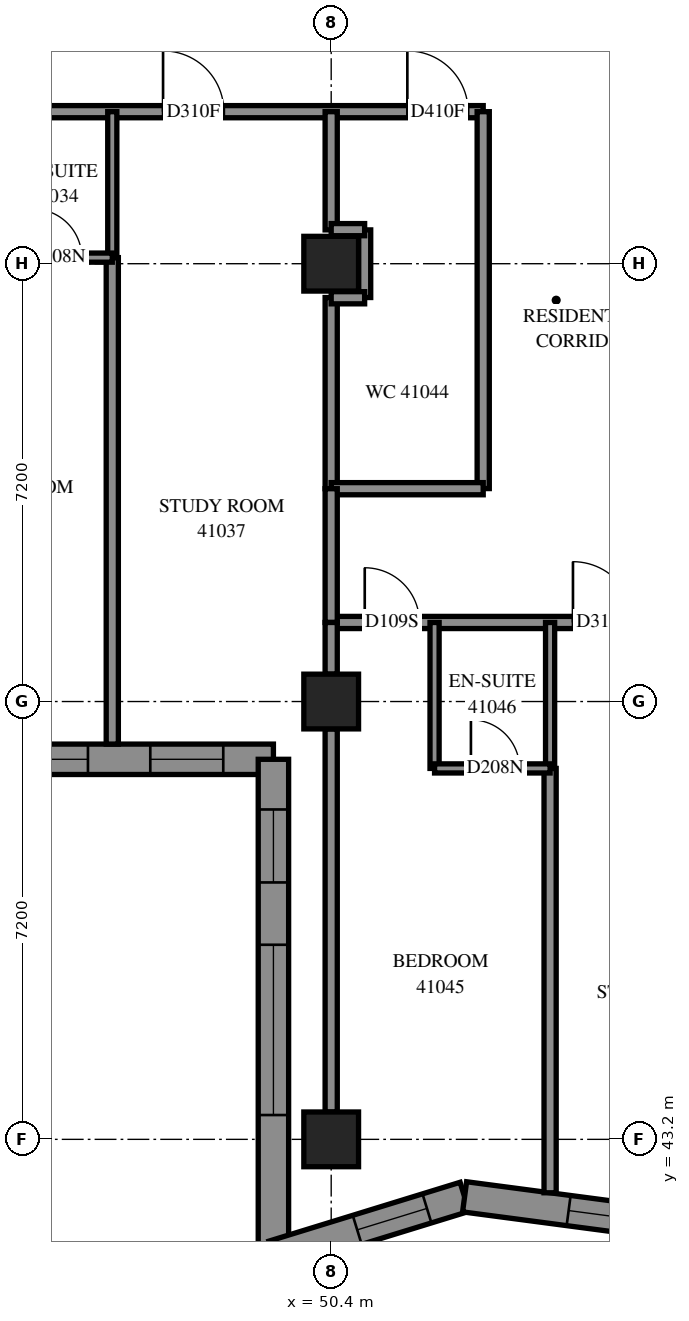
"""IFC4 building model, lengths in metres.
Left out: names, types, materials, properties, quantities, classifications, styles, units other than length and angle.
Written with IfcOpenShell. Run it as: python <this file> out.ifc"""

import sys

from ifc_helpers import new_model, si_unit, direction, frame, frame_2d, origin, origin_2d, place, context, subcontext, project, spatial, polyline, rectangle, outline, extrude, element, fill, save


model = new_model("IFC4")
c1 = context("Model", 3, precision=1e-05, world=origin(), true_north=direction((0.0, 1.0)))
c2 = subcontext(c1, "Body", "Model", "MODEL_VIEW")
j1 = project(units=[si_unit("LENGTHUNIT", "METRE"), si_unit("PLANEANGLEUNIT", "RADIAN")], contexts=[c1])
p1 = place(None, origin())
s1 = spatial("IfcSite", under=j1, at=p1, CompositionType="ELEMENT")
p2 = place(p1, origin())
s2 = spatial("IfcBuilding", under=s1, at=p2, CompositionType="ELEMENT")
p3 = place(p2, frame((0.0, 0.0, 152.4)))
s3 = spatial("IfcBuildingStorey", under=s2, at=p3, CompositionType="ELEMENT", Elevation=152.4)
for number, where, z_axis, x_axis in (
    (1, (50.4, 43.2, 0.0), (0.0, 0.0, 1.0), (1.0, 0.0, 0.0)),
    (2, (50.4, 50.4, 0.0), (0.0, 0.0, 1.0), (1.0, 0.0, 0.0)),
    (3, (50.4, 57.6, 0.0), (0.0, 0.0, 1.0), (1.0, 0.0, 0.0)),
):
    element("IfcColumn", number, at=place(p3, frame(where, z_axis=z_axis, x_axis=x_axis)), inside=s3, PredefinedType="COLUMN", context=c2, shape_type="SweptSolid", body=[
        extrude(rectangle(XDim=0.9, YDim=0.9, at=origin_2d()), origin(), (0.0, 0.0, 1.0), 3.1),
    ])
p4 = place(p3, frame((42.25, 49.45, 0.0), z_axis=(0.0, 0.0, 1.0), x_axis=(1.0, 0.0, 0.0)))
e4 = element("IfcWall", 4, at=p4, inside=s3, PredefinedType="SOLIDWALL", context=c2, shape_type="SweptSolid", body=[
    extrude(outline(polyline([(-0.25, -0.25), (6.95, -0.25), (7.45, 0.25), (0.25, 0.25), (-0.25, -0.25)])), origin(), (0.0, 0.0, 1.0), 3.1),
])
p5 = place(p4, frame((1.35, 0.0, 0.45)))
e5 = element("IfcOpeningElement", 5, at=p5, cuts=e4, PredefinedType="OPENING", context=c2, shape_type="SweptSolid", body=[
    extrude(rectangle(XDim=2.8, YDim=2.5, at=frame_2d((1.4, 1.25))), frame((0.0, 0.26, 0.0), z_axis=(0.0, -1.0, 0.0), x_axis=(1.0, 0.0, 0.0)), (0.0, 0.0, 1.0), 0.52),
])
p6 = place(p4, frame((5.175, 0.0, 0.45)))
e6 = element("IfcOpeningElement", 6, at=p6, cuts=e4, PredefinedType="OPENING", context=c2, shape_type="SweptSolid", body=[
    extrude(rectangle(XDim=1.2, YDim=2.5, at=frame_2d((0.6, 1.25))), frame((0.0, 0.26, 0.0), z_axis=(0.0, -1.0, 0.0), x_axis=(1.0, 0.0, 0.0)), (0.0, 0.0, 1.0), 0.52),
])
p7 = place(p3, frame((49.45, 49.45, 0.0), z_axis=(0.0, 0.0, 1.0), x_axis=(0.0, -1.0, 0.0)))
e7 = element("IfcWall", 7, at=p7, inside=s3, PredefinedType="SOLIDWALL", context=c2, shape_type="SweptSolid", body=[
    extrude(outline(polyline([(0.25, -0.25), (8.501, -0.25), (7.824, 0.25), (-0.25, 0.25), (0.25, -0.25)])), origin(), (0.0, 0.0, 1.0), 3.1),
])
p8 = place(p7, frame((3.05, 0.0, 0.45)))
e8 = element("IfcOpeningElement", 8, at=p8, cuts=e7, PredefinedType="OPENING", context=c2, shape_type="SweptSolid", body=[
    extrude(rectangle(XDim=2.8, YDim=2.5, at=frame_2d((1.4, 1.25))), frame((0.0, 0.26, 0.0), z_axis=(0.0, -1.0, 0.0), x_axis=(1.0, 0.0, 0.0)), (0.0, 0.0, 1.0), 0.52),
])
p9 = place(p7, frame((0.825, 0.0, 0.45)))
e9 = element("IfcOpeningElement", 9, at=p9, cuts=e7, PredefinedType="OPENING", context=c2, shape_type="SweptSolid", body=[
    extrude(rectangle(XDim=1.2, YDim=2.5, at=frame_2d((0.6, 1.25))), frame((0.0, 0.26, 0.0), z_axis=(0.0, -1.0, 0.0), x_axis=(1.0, 0.0, 0.0)), (0.0, 0.0, 1.0), 0.52),
])
p10 = place(p3, frame((49.45, 41.288, 0.0), z_axis=(0.0, 0.0, 1.0), x_axis=(0.9557612585, 0.2941435308, 0.0)))
e10 = element("IfcWall", 10, at=p10, inside=s3, PredefinedType="SOLIDWALL", context=c2, shape_type="SweptSolid", body=[
    extrude(outline(polyline([(-0.339, -0.25), (3.235, -0.25), (3.344, 0.25), (0.339, 0.25), (-0.339, -0.25)])), origin(), (0.0, 0.0, 1.0), 3.1),
])
p11 = place(p10, frame((1.442, 0.0, 0.45)))
e11 = element("IfcOpeningElement", 11, at=p11, cuts=e10, PredefinedType="OPENING", context=c2, shape_type="SweptSolid", body=[
    extrude(rectangle(XDim=1.2, YDim=2.5, at=frame_2d((0.6, 1.25))), frame((0.0, 0.26, 0.0), z_axis=(0.0, -1.0, 0.0), x_axis=(1.0, 0.0, 0.0)), (0.0, 0.0, 1.0), 0.52),
])
p12 = place(p3, frame((52.594, 42.255, 0.0), z_axis=(0.0, 0.0, 1.0), x_axis=(0.9913929124, -0.1309201792, 0.0)))
e12 = element("IfcWall", 12, at=p12, inside=s3, PredefinedType="SOLIDWALL", context=c2, shape_type="SweptSolid", body=[
    extrude(outline(polyline([(0.055, -0.25), (3.499, -0.25), (3.433, 0.25), (-0.055, 0.25), (0.055, -0.25)])), origin(), (0.0, 0.0, 1.0), 3.1),
])
p13 = place(p12, frame((1.726, 0.0, 0.45)))
e13 = element("IfcOpeningElement", 13, at=p13, cuts=e12, PredefinedType="OPENING", context=c2, shape_type="SweptSolid", body=[
    extrude(rectangle(XDim=1.2, YDim=2.5, at=frame_2d((0.6, 1.25))), frame((0.0, 0.26, 0.0), z_axis=(0.0, -1.0, 0.0), x_axis=(1.0, 0.0, 0.0)), (0.0, 0.0, 1.0), 0.52),
])
p14 = place(p3, frame((36.0, 60.1, 0.0), z_axis=(0.0, 0.0, 1.0), x_axis=(1.0, 0.0, 0.0)))
e14 = element("IfcWall", 14, at=p14, inside=s3, PredefinedType="PARTITIONING", context=c2, shape_type="SweptSolid", body=[
    extrude(rectangle(XDim=16.9, YDim=0.2, at=frame_2d((8.45, 0.0))), origin(), (0.0, 0.0, 1.0), 3.1),
])
p15 = place(p14, frame((4.125, 0.0, 0.0)))
e15 = element("IfcOpeningElement", 15, at=p15, cuts=e14, PredefinedType="OPENING", context=c2, shape_type="SweptSolid", body=[
    extrude(rectangle(XDim=1.0, YDim=2.1, at=frame_2d((0.5, 1.05))), frame((0.0, 0.11, 0.0), z_axis=(0.0, -1.0, 0.0), x_axis=(1.0, 0.0, 0.0)), (0.0, 0.0, 1.0), 0.22),
])
p16 = place(p14, frame((7.6, 0.0, 0.0)))
e16 = element("IfcOpeningElement", 16, at=p16, cuts=e14, PredefinedType="OPENING", context=c2, shape_type="SweptSolid", body=[
    extrude(rectangle(XDim=0.9, YDim=2.1, at=frame_2d((0.45, 1.05))), frame((0.0, 0.11, 0.0), z_axis=(0.0, -1.0, 0.0), x_axis=(1.0, 0.0, 0.0)), (0.0, 0.0, 1.0), 0.22),
])
p17 = place(p14, frame((11.635, 0.0, 0.0)))
e17 = element("IfcOpeningElement", 17, at=p17, cuts=e14, PredefinedType="OPENING", context=c2, shape_type="SweptSolid", body=[
    extrude(rectangle(XDim=1.0, YDim=2.1, at=frame_2d((0.5, 1.05))), frame((0.0, 0.11, 0.0), z_axis=(0.0, -1.0, 0.0), x_axis=(1.0, 0.0, 0.0)), (0.0, 0.0, 1.0), 0.22),
])
p18 = place(p14, frame((15.652, 0.0, 0.0)))
e18 = element("IfcOpeningElement", 18, at=p18, cuts=e14, PredefinedType="OPENING", context=c2, shape_type="SweptSolid", body=[
    extrude(rectangle(XDim=1.0, YDim=2.1, at=frame_2d((0.5, 1.05))), frame((0.0, 0.11, 0.0), z_axis=(0.0, -1.0, 0.0), x_axis=(1.0, 0.0, 0.0)), (0.0, 0.0, 1.0), 0.22),
])
p19 = place(p3, frame((46.8, 49.7, 0.0), z_axis=(0.0, 0.0, 1.0), x_axis=(0.0, 1.0, 0.0)))
e19 = element("IfcWall", 19, at=p19, inside=s3, PredefinedType="PARTITIONING", context=c2, shape_type="SweptSolid", body=[
    extrude(rectangle(XDim=8.0, YDim=0.2, at=frame_2d((4.0, 0.0))), origin(), (0.0, 0.0, 1.0), 3.1),
])
p20 = place(p3, frame((54.0, 42.321, 0.0), z_axis=(0.0, 0.0, 1.0), x_axis=(0.0, 1.0, 0.0)))
e20 = element("IfcWall", 20, at=p20, inside=s3, PredefinedType="PARTITIONING", context=c2, shape_type="SweptSolid", body=[
    extrude(rectangle(XDim=6.979, YDim=0.2, at=frame_2d((3.489, 0.0))), origin(), (0.0, 0.0, 1.0), 3.1),
])
p21 = place(p3, frame((50.4, 43.65, 0.0), z_axis=(0.0, 0.0, 1.0), x_axis=(0.0, 1.0, 0.0)))
e21 = element("IfcWall", 21, at=p21, inside=s3, PredefinedType="PARTITIONING", context=c2, shape_type="SweptSolid", body=[
    extrude(rectangle(XDim=6.3, YDim=0.2, at=frame_2d((3.15, 0.0))), origin(), (0.0, 0.0, 1.0), 2.6),
])
p22 = place(p3, frame((52.9, 53.902, 0.0), z_axis=(0.0, 0.0, 1.0), x_axis=(0.0, 1.0, 0.0)))
e22 = element("IfcWall", 22, at=p22, inside=s3, PredefinedType="PARTITIONING", context=c2, shape_type="SweptSolid", body=[
    extrude(rectangle(XDim=6.198, YDim=0.2, at=frame_2d((3.099, 0.0))), origin(), (0.0, 0.0, 1.0), 3.1),
])
p23 = place(p3, frame((50.4, 51.7, 0.0), z_axis=(0.0, 0.0, 1.0), x_axis=(1.0, 0.0, 0.0)))
e23 = element("IfcWall", 23, at=p23, inside=s3, PredefinedType="PARTITIONING", context=c2, shape_type="SweptSolid", body=[
    extrude(rectangle(XDim=5.1, YDim=0.2, at=frame_2d((2.55, 0.0))), origin(), (0.0, 0.0, 1.0), 3.1),
])
p24 = place(p23, frame((0.552, 0.0, 0.0)))
e24 = element("IfcOpeningElement", 24, at=p24, cuts=e23, PredefinedType="OPENING", context=c2, shape_type="SweptSolid", body=[
    extrude(rectangle(XDim=0.9, YDim=2.1, at=frame_2d((0.45, 1.05))), frame((0.0, 0.11, 0.0), z_axis=(0.0, -1.0, 0.0), x_axis=(1.0, 0.0, 0.0)), (0.0, 0.0, 1.0), 0.22),
])
p25 = place(p23, frame((3.976, 0.0, 0.0)))
e25 = element("IfcOpeningElement", 25, at=p25, cuts=e23, PredefinedType="OPENING", context=c2, shape_type="SweptSolid", body=[
    extrude(rectangle(XDim=1.0, YDim=2.1, at=frame_2d((0.5, 1.05))), frame((0.0, 0.11, 0.0), z_axis=(0.0, -1.0, 0.0), x_axis=(1.0, 0.0, 0.0)), (0.0, 0.0, 1.0), 0.22),
])
p26 = place(p3, frame((50.4, 53.9, 0.0), z_axis=(0.0, 0.0, 1.0), x_axis=(0.0, 1.0, 0.0)))
e26 = element("IfcWall", 26, at=p26, inside=s3, PredefinedType="PARTITIONING", context=c2, shape_type="SweptSolid", body=[
    extrude(rectangle(XDim=3.144, YDim=0.2, at=frame_2d((1.572, 0.0))), origin(), (0.0, 0.0, 1.0), 3.1),
])
p27 = place(p3, frame((50.4, 53.9, 0.0), z_axis=(0.0, 0.0, 1.0), x_axis=(1.0, 0.0, 0.0)))
e27 = element("IfcWall", 27, at=p27, inside=s3, PredefinedType="PARTITIONING", context=c2, shape_type="SweptSolid", body=[
    extrude(rectangle(XDim=2.5, YDim=0.2, at=frame_2d((1.25, 0.0))), origin(), (0.0, 0.0, 1.0), 3.1),
])
for number, where, z_axis, x_axis in (
    (28, (52.1, 49.3, 0.0), (0.0, 0.0, 1.0), (0.0, 1.0, 0.0)),
    (29, (54.0, 49.3, 0.0), (0.0, 0.0, 1.0), (0.0, 1.0, 0.0)),
    (30, (46.8, 57.7, 0.0), (0.0, 0.0, 1.0), (0.0, 1.0, 0.0)),
):
    element("IfcWall", number, at=place(p3, frame(where, z_axis=z_axis, x_axis=x_axis)), inside=s3, PredefinedType="PARTITIONING", context=c2, shape_type="SweptSolid", body=[
        extrude(rectangle(XDim=2.4, YDim=0.15, at=frame_2d((1.2, 0.0))), origin(), (0.0, 0.0, 1.0), 3.1),
    ])
p28 = place(p3, frame((50.4, 51.7, 0.0), z_axis=(0.0, 0.0, 1.0), x_axis=(0.0, 1.0, 0.0)))
e31 = element("IfcWall", 31, at=p28, inside=s3, PredefinedType="PARTITIONING", context=c2, shape_type="SweptSolid", body=[
    extrude(rectangle(XDim=2.2, YDim=0.2, at=frame_2d((1.1, 0.0))), origin(), (0.0, 0.0, 1.0), 3.1),
])
p29 = place(p3, frame((50.4, 58.156, 0.0), z_axis=(0.0, 0.0, 1.0), x_axis=(0.0, 1.0, 0.0)))
e32 = element("IfcWall", 32, at=p29, inside=s3, PredefinedType="PARTITIONING", context=c2, shape_type="SweptSolid", body=[
    extrude(rectangle(XDim=1.944, YDim=0.2, at=frame_2d((0.972, 0.0))), origin(), (0.0, 0.0, 1.0), 3.1),
])
p30 = place(p3, frame((44.9, 57.7, 0.0), z_axis=(0.0, 0.0, 1.0), x_axis=(1.0, 0.0, 0.0)))
e33 = element("IfcWall", 33, at=p30, inside=s3, PredefinedType="PARTITIONING", context=c2, shape_type="SweptSolid", body=[
    extrude(rectangle(XDim=1.9, YDim=0.15, at=frame_2d((0.95, 0.0))), origin(), (0.0, 0.0, 1.0), 3.1),
])
p31 = place(p30, frame((0.598, 0.0, 0.0)))
e34 = element("IfcOpeningElement", 34, at=p31, cuts=e33, PredefinedType="OPENING", context=c2, shape_type="SweptSolid", body=[
    extrude(rectangle(XDim=0.8, YDim=2.1, at=frame_2d((0.4, 1.05))), frame((0.0, 0.085, 0.0), z_axis=(0.0, -1.0, 0.0), x_axis=(1.0, 0.0, 0.0)), (0.0, 0.0, 1.0), 0.17),
])
p32 = place(p3, frame((52.1, 49.3, 0.0), z_axis=(0.0, 0.0, 1.0), x_axis=(1.0, 0.0, 0.0)))
e35 = element("IfcWall", 35, at=p32, inside=s3, PredefinedType="PARTITIONING", context=c2, shape_type="SweptSolid", body=[
    extrude(rectangle(XDim=1.9, YDim=0.15, at=frame_2d((0.95, 0.0))), origin(), (0.0, 0.0, 1.0), 3.1),
])
p33 = place(p32, frame((0.598, 0.0, 0.0)))
e36 = element("IfcOpeningElement", 36, at=p33, cuts=e35, PredefinedType="OPENING", context=c2, shape_type="SweptSolid", body=[
    extrude(rectangle(XDim=0.8, YDim=2.1, at=frame_2d((0.4, 1.05))), frame((0.0, 0.085, 0.0), z_axis=(0.0, -1.0, 0.0), x_axis=(1.0, 0.0, 0.0)), (0.0, 0.0, 1.0), 0.17),
])
p34 = place(p3, frame((50.95, 57.044, 0.0), z_axis=(0.0, 0.0, 1.0), x_axis=(0.0, 1.0, 0.0)))
e37 = element("IfcWall", 37, at=p34, inside=s3, PredefinedType="PARTITIONING", context=c2, shape_type="SweptSolid", body=[
    extrude(rectangle(XDim=1.112, YDim=0.2, at=frame_2d((0.556, 0.0))), origin(), (0.0, 0.0, 1.0), 3.1),
])
p35 = place(p3, frame((50.4, 50.85, 0.0), z_axis=(0.0, 0.0, 1.0), x_axis=(0.0, 1.0, 0.0)))
e38 = element("IfcWall", 38, at=p35, inside=s3, PredefinedType="PARTITIONING", context=c2, shape_type="SweptSolid", body=[
    extrude(rectangle(XDim=0.85, YDim=0.2, at=frame_2d((0.425, 0.0))), origin(), (0.0, 0.0, 1.0), 3.1),
])
for number, where, z_axis, x_axis in (
    (39, (50.4, 58.16, 0.0), (0.0, 0.0, 1.0), (1.0, 0.0, 0.0)),
    (40, (50.4, 57.04, 0.0), (0.0, 0.0, 1.0), (1.0, 0.0, 0.0)),
):
    element("IfcWall", number, at=place(p3, frame(where, z_axis=z_axis, x_axis=x_axis)), inside=s3, PredefinedType="PARTITIONING", context=c2, shape_type="SweptSolid", body=[
        extrude(rectangle(XDim=0.55, YDim=0.2, at=frame_2d((0.275, 0.0))), origin(), (0.0, 0.0, 1.0), 3.1),
    ])
p36 = place(p5, origin())
e41 = element("IfcWindow", 41, at=p36, inside=s3, PartitioningType="SINGLE_PANEL", PredefinedType="WINDOW", context=c2, shape_type="SweptSolid", body=[
    extrude(rectangle(XDim=2.8, YDim=2.5, at=frame_2d((1.4, 1.25))), frame((0.0, 0.18, 0.0), z_axis=(0.0, -1.0, 0.0), x_axis=(1.0, 0.0, 0.0)), (0.0, 0.0, 1.0), 0.06),
])
fill(e5, e41)
p37 = place(p6, origin())
e42 = element("IfcWindow", 42, at=p37, inside=s3, PartitioningType="SINGLE_PANEL", PredefinedType="WINDOW", context=c2, shape_type="SweptSolid", body=[
    extrude(rectangle(XDim=1.2, YDim=2.5, at=frame_2d((0.6, 1.25))), frame((0.0, 0.18, 0.0), z_axis=(0.0, -1.0, 0.0), x_axis=(1.0, 0.0, 0.0)), (0.0, 0.0, 1.0), 0.06),
])
fill(e6, e42)
p38 = place(p8, origin())
e43 = element("IfcWindow", 43, at=p38, inside=s3, PartitioningType="SINGLE_PANEL", PredefinedType="WINDOW", context=c2, shape_type="SweptSolid", body=[
    extrude(rectangle(XDim=2.8, YDim=2.5, at=frame_2d((1.4, 1.25))), frame((0.0, 0.18, 0.0), z_axis=(0.0, -1.0, 0.0), x_axis=(1.0, 0.0, 0.0)), (0.0, 0.0, 1.0), 0.06),
])
fill(e8, e43)
p39 = place(p9, origin())
e44 = element("IfcWindow", 44, at=p39, inside=s3, PartitioningType="SINGLE_PANEL", PredefinedType="WINDOW", context=c2, shape_type="SweptSolid", body=[
    extrude(rectangle(XDim=1.2, YDim=2.5, at=frame_2d((0.6, 1.25))), frame((0.0, 0.18, 0.0), z_axis=(0.0, -1.0, 0.0), x_axis=(1.0, 0.0, 0.0)), (0.0, 0.0, 1.0), 0.06),
])
fill(e9, e44)
p40 = place(p11, origin())
e45 = element("IfcWindow", 45, at=p40, inside=s3, PartitioningType="SINGLE_PANEL", PredefinedType="WINDOW", context=c2, shape_type="SweptSolid", body=[
    extrude(rectangle(XDim=1.2, YDim=2.5, at=frame_2d((0.6, 1.25))), frame((0.0, 0.18, 0.0), z_axis=(0.0, -1.0, 0.0), x_axis=(1.0, 0.0, 0.0)), (0.0, 0.0, 1.0), 0.06),
])
fill(e11, e45)
p41 = place(p13, origin())
e46 = element("IfcWindow", 46, at=p41, inside=s3, PartitioningType="SINGLE_PANEL", PredefinedType="WINDOW", context=c2, shape_type="SweptSolid", body=[
    extrude(rectangle(XDim=1.2, YDim=2.5, at=frame_2d((0.6, 1.25))), frame((0.0, 0.18, 0.0), z_axis=(0.0, -1.0, 0.0), x_axis=(1.0, 0.0, 0.0)), (0.0, 0.0, 1.0), 0.06),
])
fill(e13, e46)
p42 = place(p31, origin())
e47 = element("IfcDoor", 47, at=p42, inside=s3, OperationType="SINGLE_SWING_RIGHT", PredefinedType="DOOR", context=c2, shape_type="SweptSolid", body=[
    extrude(rectangle(XDim=0.8, YDim=2.1, at=frame_2d((0.4, 1.05))), frame((0.0, 0.025, 0.0), z_axis=(0.0, -1.0, 0.0), x_axis=(1.0, 0.0, 0.0)), (0.0, 0.0, 1.0), 0.05),
])
fill(e34, e47)
p43 = place(p17, origin())
e48 = element("IfcDoor", 48, at=p43, inside=s3, OperationType="SINGLE_SWING_RIGHT", PredefinedType="DOOR", context=c2, shape_type="SweptSolid", body=[
    extrude(rectangle(XDim=1.0, YDim=2.1, at=frame_2d((0.5, 1.05))), frame((0.0, 0.025, 0.0), z_axis=(0.0, -1.0, 0.0), x_axis=(1.0, 0.0, 0.0)), (0.0, 0.0, 1.0), 0.05),
])
fill(e17, e48)
p44 = place(p18, origin())
e49 = element("IfcDoor", 49, at=p44, inside=s3, OperationType="SINGLE_SWING_LEFT", PredefinedType="DOOR", context=c2, shape_type="SweptSolid", body=[
    extrude(rectangle(XDim=1.0, YDim=2.1, at=frame_2d((0.5, 1.05))), frame((0.0, 0.025, 0.0), z_axis=(0.0, -1.0, 0.0), x_axis=(1.0, 0.0, 0.0)), (0.0, 0.0, 1.0), 0.05),
])
fill(e18, e49)
p45 = place(p24, origin())
e50 = element("IfcDoor", 50, at=p45, inside=s3, OperationType="SINGLE_SWING_LEFT", PredefinedType="DOOR", context=c2, shape_type="SweptSolid", body=[
    extrude(rectangle(XDim=0.9, YDim=2.1, at=frame_2d((0.45, 1.05))), frame((0.0, 0.025, 0.0), z_axis=(0.0, -1.0, 0.0), x_axis=(1.0, 0.0, 0.0)), (0.0, 0.0, 1.0), 0.05),
])
fill(e24, e50)
p46 = place(p33, origin())
e51 = element("IfcDoor", 51, at=p46, inside=s3, OperationType="SINGLE_SWING_RIGHT", PredefinedType="DOOR", context=c2, shape_type="SweptSolid", body=[
    extrude(rectangle(XDim=0.8, YDim=2.1, at=frame_2d((0.4, 1.05))), frame((0.0, 0.025, 0.0), z_axis=(0.0, -1.0, 0.0), x_axis=(1.0, 0.0, 0.0)), (0.0, 0.0, 1.0), 0.05),
])
fill(e36, e51)
p47 = place(p25, origin())
e52 = element("IfcDoor", 52, at=p47, inside=s3, OperationType="SINGLE_SWING_RIGHT", PredefinedType="DOOR", context=c2, shape_type="SweptSolid", body=[
    extrude(rectangle(XDim=1.0, YDim=2.1, at=frame_2d((0.5, 1.05))), frame((0.0, 0.025, 0.0), z_axis=(0.0, -1.0, 0.0), x_axis=(1.0, 0.0, 0.0)), (0.0, 0.0, 1.0), 0.05),
])
fill(e25, e52)
save(model, sys.argv[1])
